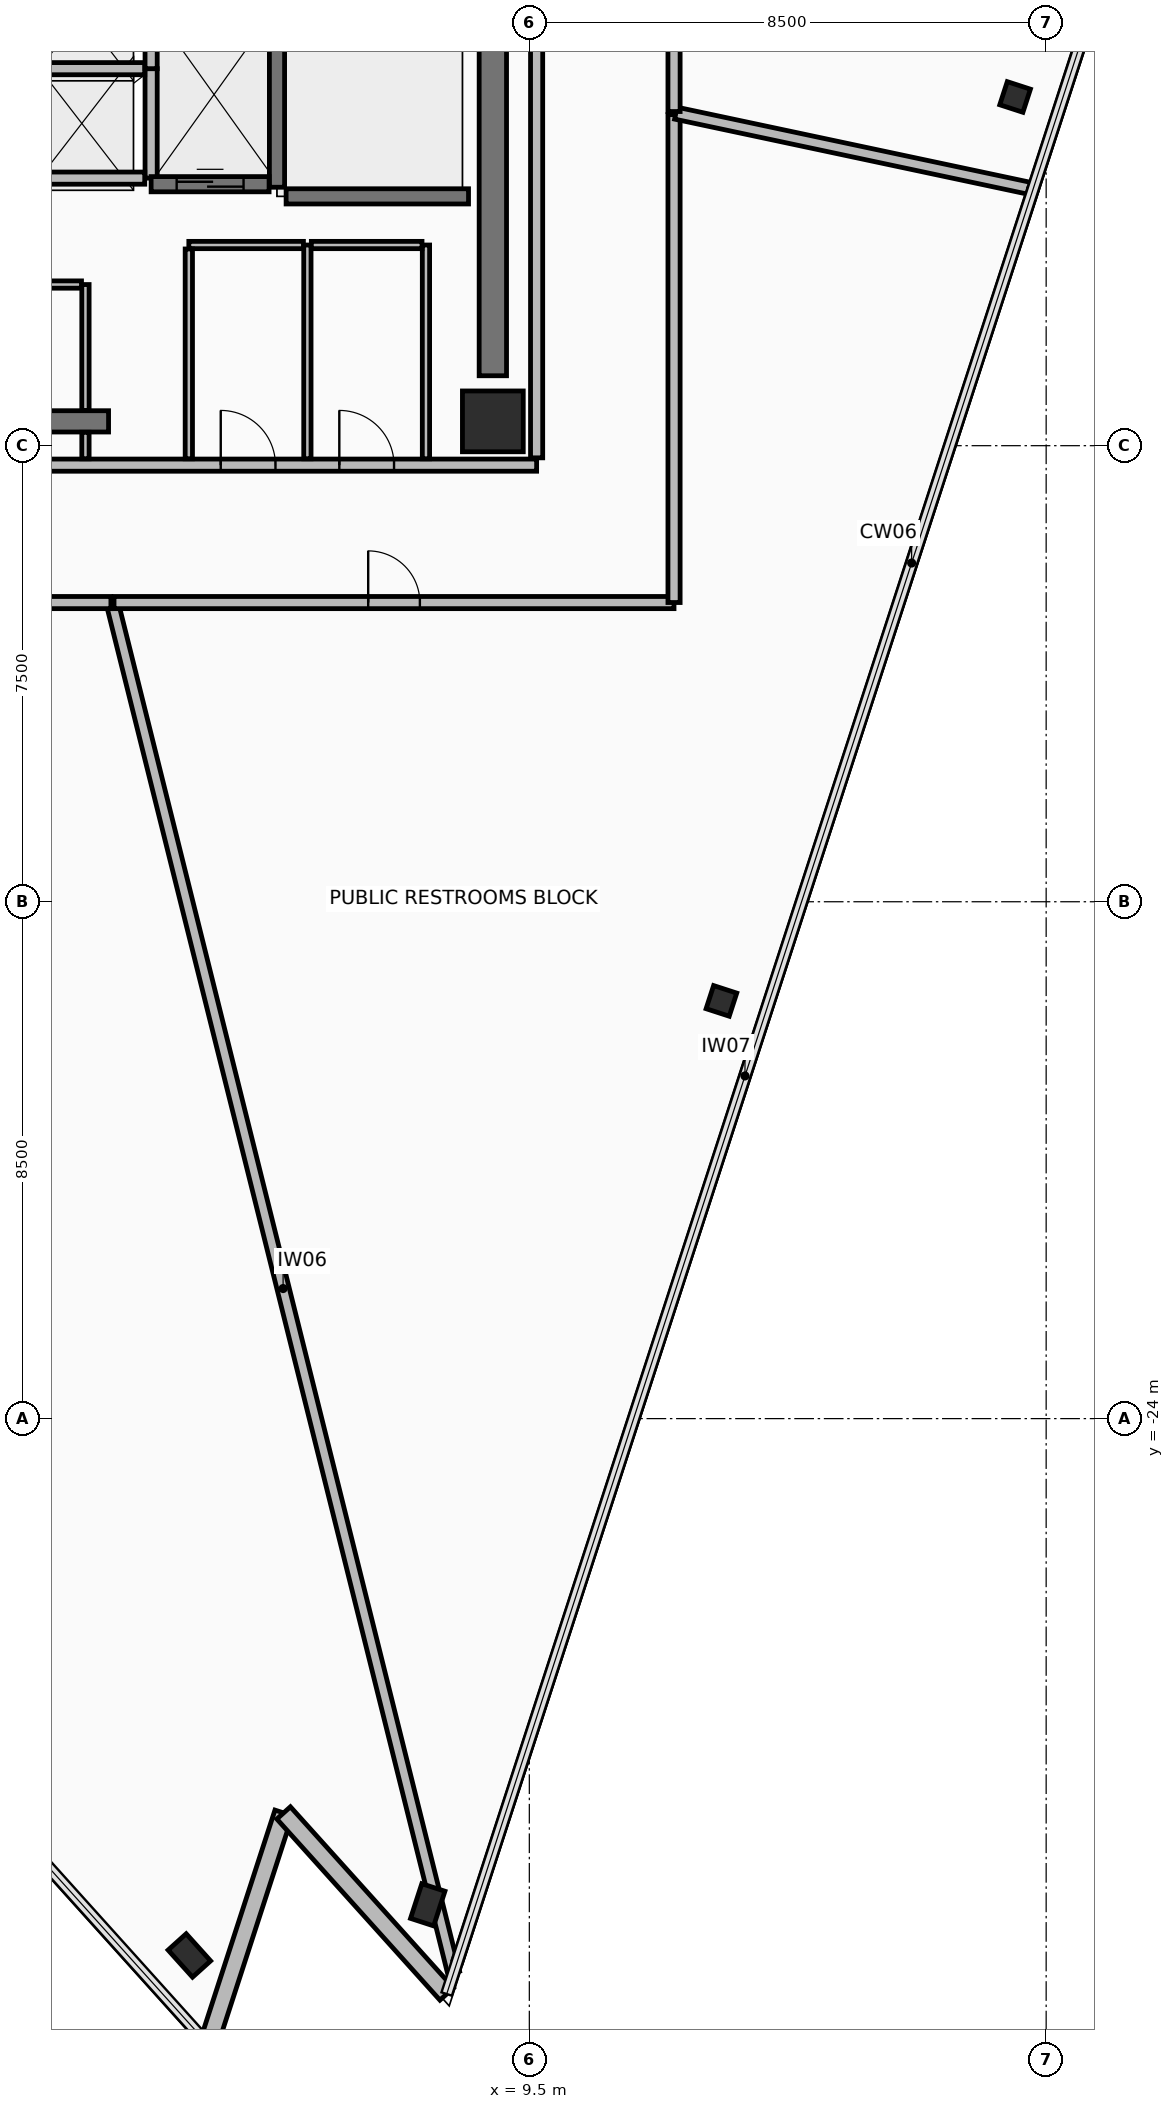
"""IFC4 building model, lengths in metres.
Left out: names, types, materials, properties, quantities, classifications, styles, units other than length and angle.
Written with IfcOpenShell. Run it as: python <this file> out.ifc"""

import sys

from ifc_helpers import new_model, si_unit, direction, frame, frame_2d, origin, origin_2d, place, context, subcontext, project, spatial, rectangle, hollow_rectangle, extrude, element, fill, save


model = new_model("IFC4")
c1 = context("Model", 3, precision=1e-05, world=origin(), true_north=direction((0.0, 1.0)))
c2 = subcontext(c1, "Body", "Model", "MODEL_VIEW")
j1 = project(units=[si_unit("LENGTHUNIT", "METRE"), si_unit("PLANEANGLEUNIT", "RADIAN")], contexts=[c1])
p1 = place(None, origin())
s1 = spatial("IfcSite", under=j1, at=p1, CompositionType="ELEMENT")
p2 = place(p1, origin())
s2 = spatial("IfcBuilding", under=s1, at=p2, CompositionType="ELEMENT")
p3 = place(p2, frame((0.0, 0.0, 283.4)))
s3 = spatial("IfcBuildingStorey", under=s2, at=p3, CompositionType="ELEMENT", Elevation=283.4)
p4 = place(p3, frame((8.9, -7.6, 0.0), z_axis=(0.0, 0.0, 1.0), x_axis=(1.0, 0.0, 0.0)))
e1 = element("IfcColumn", 1, at=p4, inside=s3, PredefinedType="COLUMN", context=c2, shape_type="SweptSolid", body=[
    extrude(rectangle(XDim=1.0, YDim=1.0, at=origin_2d()), origin(), (0.0, 0.0, 1.0), 3.65),
])
for number, where, z_axis, x_axis in (
    (2, (3.909, -32.829, 0.0), (0.0, 0.0, 1.0), (-0.669, 0.743, 0.0)),
    (3, (7.829, -31.996, 0.0), (0.0, 0.0, 1.0), (0.309, 0.951, 0.0)),
):
    element("IfcColumn", number, at=place(p3, frame(where, z_axis=z_axis, x_axis=x_axis)), inside=s3, PredefinedType="COLUMN", context=c2, shape_type="SweptSolid", body=[
        extrude(hollow_rectangle(XDim=0.4, YDim=0.6, WallThickness=0.03, at=origin_2d()), origin(), (0.0, 0.0, 1.0), 3.65),
    ])
for number, where, z_axis, x_axis in (
    (4, (12.659, -17.131, 0.0), (0.0, 0.0, 1.0), (0.309, 0.951, 0.0)),
    (5, (17.489, -2.265, 0.0), (0.0, 0.0, 1.0), (0.309, 0.951, 0.0)),
):
    element("IfcColumn", number, at=place(p3, frame(where, z_axis=z_axis, x_axis=x_axis)), inside=s3, PredefinedType="COLUMN", context=c2, shape_type="SweptSolid", body=[
        extrude(hollow_rectangle(XDim=0.4, YDim=0.4, WallThickness=0.025, at=origin_2d()), origin(), (0.0, 0.0, 1.0), 3.65),
    ])
p5 = place(p3, frame((4.221, -34.296, 0.0), z_axis=(0.0, 0.0, 1.0), x_axis=(0.309018580232, 0.951056001018, 0.0)))
e6 = element("IfcWall", 6, at=p5, inside=s3, PredefinedType="STANDARD", context=c2, shape_type="SweptSolid", body=[
    extrude(rectangle(XDim=4.008, YDim=0.3, at=frame_2d((2.004, 0.0))), origin(), (0.0, 0.0, 1.0), 2.81),
])
p6 = place(p3, frame((5.459, -30.484, 0.0), z_axis=(0.0, 0.0, 1.0), x_axis=(0.669132983361, -0.743142685208, 0.0)))
e7 = element("IfcWall", 7, at=p6, inside=s3, PredefinedType="STANDARD", context=c2, shape_type="SweptSolid", body=[
    extrude(rectangle(XDim=4.008, YDim=0.3, at=frame_2d((2.004, 0.0))), origin(), (0.0, 0.0, 1.0), 2.81),
])
p7 = place(p3, frame((-2.8, -7.6, 0.0), z_axis=(0.0, 0.0, 1.0), x_axis=(1.0, 0.0, 0.0)))
e8 = element("IfcWall", 8, at=p7, inside=s3, PredefinedType="SHEAR", context=c2, shape_type="SweptSolid", body=[
    extrude(rectangle(XDim=5.38, YDim=0.35, at=frame_2d((2.69, 0.0))), origin(), (0.0, 0.0, 1.0), 3.465),
])
p8 = place(p3, frame((8.9, -6.85, 0.0), z_axis=(0.0, 0.0, 1.0), x_axis=(0.0, 1.0, 0.0)))
e9 = element("IfcWall", 9, at=p8, inside=s3, PredefinedType="SHEAR", context=c2, shape_type="SweptSolid", body=[
    extrude(rectangle(XDim=10.7, YDim=0.45, at=frame_2d((5.35, 0.0))), origin(), (0.0, 0.0, 1.0), 3.465),
])
p9 = place(p3, frame((-9.62, -8.32, 0.0), z_axis=(0.0, 0.0, 1.0), x_axis=(1.0, 0.0, 0.0)))
e10 = element("IfcWall", 10, at=p9, inside=s3, PredefinedType="PARTITIONING", context=c2, shape_type="SweptSolid", body=[
    extrude(rectangle(XDim=19.24, YDim=0.2, at=frame_2d((9.62, 0.0))), origin(), (0.0, 0.0, 1.0), 2.96),
])
p10 = place(p9, frame((8.57, 0.0, 0.0)))
e11 = element("IfcOpeningElement", 11, at=p10, cuts=e10, PredefinedType="OPENING", context=c2, shape_type="SweptSolid", body=[
    extrude(rectangle(XDim=0.9, YDim=2.1, at=frame_2d((0.45, 1.05))), frame((0.0, 0.11, 0.0), z_axis=(0.0, -1.0, 0.0), x_axis=(1.0, 0.0, 0.0)), (0.0, 0.0, 1.0), 0.22),
])
p11 = place(p9, frame((14.045, 0.0, 0.0)))
e12 = element("IfcOpeningElement", 12, at=p11, cuts=e10, PredefinedType="OPENING", context=c2, shape_type="SweptSolid", body=[
    extrude(rectangle(XDim=0.9, YDim=2.1, at=frame_2d((0.45, 1.05))), frame((0.0, 0.11, 0.0), z_axis=(0.0, -1.0, 0.0), x_axis=(1.0, 0.0, 0.0)), (0.0, 0.0, 1.0), 0.22),
])
p12 = place(p9, frame((15.995, 0.0, 0.0)))
e13 = element("IfcOpeningElement", 13, at=p12, cuts=e10, PredefinedType="OPENING", context=c2, shape_type="SweptSolid", body=[
    extrude(rectangle(XDim=0.9, YDim=2.1, at=frame_2d((0.45, 1.05))), frame((0.0, 0.11, 0.0), z_axis=(0.0, -1.0, 0.0), x_axis=(1.0, 0.0, 0.0)), (0.0, 0.0, 1.0), 0.22),
])
p13 = place(p3, frame((9.62, -8.2, 0.0), z_axis=(0.0, 0.0, 1.0), x_axis=(0.0, 1.0, 0.0)))
e14 = element("IfcWall", 14, at=p13, inside=s3, PredefinedType="PARTITIONING", context=c2, shape_type="SweptSolid", body=[
    extrude(rectangle(XDim=16.4, YDim=0.2, at=frame_2d((8.2, 0.0))), origin(), (0.0, 0.0, 1.0), 2.96),
])
p14 = place(p13, frame((12.65, 0.0, 0.0)))
e15 = element("IfcOpeningElement", 15, at=p14, cuts=e14, PredefinedType="OPENING", context=c2, shape_type="SweptSolid", body=[
    extrude(rectangle(XDim=1.1, YDim=2.15, at=frame_2d((0.55, 1.075))), frame((0.0, 0.11, 0.0), z_axis=(0.0, -1.0, 0.0), x_axis=(1.0, 0.0, 0.0)), (0.0, 0.0, 1.0), 0.22),
])
p15 = place(p3, frame((5.35, -3.75, 0.0), z_axis=(0.0, 0.0, 1.0), x_axis=(0.0, 1.0, 0.0)))
e16 = element("IfcWall", 16, at=p15, inside=s3, PredefinedType="SHEAR", context=c2, shape_type="SweptSolid", body=[
    extrude(rectangle(XDim=7.3, YDim=0.25, at=frame_2d((3.65, 0.0))), origin(), (0.0, 0.0, 1.0), 3.465),
])
p16 = place(p3, frame((5.5, -3.9, 0.0), z_axis=(0.0, 0.0, 1.0), x_axis=(1.0, 0.0, 0.0)))
e17 = element("IfcWall", 17, at=p16, inside=s3, PredefinedType="SHEAR", context=c2, shape_type="SweptSolid", body=[
    extrude(rectangle(XDim=3.0, YDim=0.25, at=frame_2d((1.5, 0.0))), origin(), (0.0, 0.0, 1.0), 3.465),
])
p17 = place(p3, frame((3.28, -3.6, 0.0), z_axis=(0.0, 0.0, 1.0), x_axis=(0.0, 1.0, 0.0)))
e18 = element("IfcWall", 18, at=p17, inside=s3, PredefinedType="PARTITIONING", context=c2, shape_type="SweptSolid", body=[
    extrude(rectangle(XDim=1.8, YDim=0.2, at=frame_2d((0.9, 0.0))), origin(), (0.0, 0.0, 1.0), 3.465),
])
for number, where, z_axis, x_axis in (
    (19, (1.13, -3.6, 0.0), (0.0, 0.0, 1.0), (1.0, 0.0, 0.0)),
    (20, (1.13, -1.8, 0.0), (0.0, 0.0, 1.0), (1.0, 0.0, 0.0)),
):
    element("IfcWall", number, at=place(p3, frame(where, z_axis=z_axis, x_axis=x_axis)), inside=s3, PredefinedType="PARTITIONING", context=c2, shape_type="SweptSolid", body=[
        extrude(rectangle(XDim=2.045, YDim=0.2, at=frame_2d((1.022, 0.0))), origin(), (0.0, 0.0, 1.0), 3.465),
    ])
p18 = place(p3, frame((3.28, -1.8, 0.0), z_axis=(0.0, 0.0, 1.0), x_axis=(0.0, 1.0, 0.0)))
e21 = element("IfcWall", 21, at=p18, inside=s3, PredefinedType="PARTITIONING", context=c2, shape_type="SweptSolid", body=[
    extrude(rectangle(XDim=1.8, YDim=0.2, at=frame_2d((0.9, 0.0))), origin(), (0.0, 0.0, 1.0), 3.465),
])
p19 = place(p3, frame((3.28, -3.7, 0.0), z_axis=(0.0, 0.0, 1.0), x_axis=(1.0, 0.0, 0.0)))
e22 = element("IfcWall", 22, at=p19, inside=s3, PredefinedType="SHEAR", context=c2, shape_type="SweptSolid", body=[
    extrude(rectangle(XDim=1.94, YDim=0.25, at=frame_2d((0.97, 0.0))), origin(), (0.0, 0.0, 1.0), 3.465),
])
p20 = place(p19, frame((0.42, 0.0, 0.0)))
e23 = element("IfcOpeningElement", 23, at=p20, cuts=e22, PredefinedType="OPENING", context=c2, shape_type="SweptSolid", body=[
    extrude(rectangle(XDim=1.1, YDim=2.2, at=frame_2d((0.55, 1.1))), frame((0.0, 0.135, 0.0), z_axis=(0.0, -1.0, 0.0), x_axis=(1.0, 0.0, 0.0)), (0.0, 0.0, 1.0), 0.27),
])
p21 = place(p3, frame((2.2, -8.215, 0.0), z_axis=(0.0, 0.0, 1.0), x_axis=(0.0, 1.0, 0.0)))
e24 = element("IfcWall", 24, at=p21, inside=s3, PredefinedType="PARTITIONING", context=c2, shape_type="SweptSolid", body=[
    extrude(rectangle(XDim=0.435, YDim=0.12, at=frame_2d((0.218, 0.0))), origin(), (0.0, 0.0, 1.0), 2.76),
])
p22 = place(p3, frame((2.2, -7.42, 0.0), z_axis=(0.0, 0.0, 1.0), x_axis=(0.0, 1.0, 0.0)))
e25 = element("IfcWall", 25, at=p22, inside=s3, PredefinedType="PARTITIONING", context=c2, shape_type="SweptSolid", body=[
    extrude(rectangle(XDim=2.07, YDim=0.12, at=frame_2d((1.035, 0.0))), origin(), (0.0, 0.0, 1.0), 2.76),
])
p23 = place(p3, frame((2.135, -5.35, 0.0), z_axis=(0.0, 0.0, 1.0), x_axis=(-1.0, 0.0, 0.0)))
e26 = element("IfcWall", 26, at=p23, inside=s3, PredefinedType="PARTITIONING", context=c2, shape_type="SweptSolid", body=[
    extrude(rectangle(XDim=5.535, YDim=0.12, at=frame_2d((2.768, 0.0))), origin(), (0.0, 0.0, 1.0), 2.76),
])
p24 = place(p3, frame((5.85, -8.215, 0.0), z_axis=(0.0, 0.0, 1.0), x_axis=(0.0, 1.0, 0.0)))
e27 = element("IfcWall", 27, at=p24, inside=s3, PredefinedType="PARTITIONING", context=c2, shape_type="SweptSolid", body=[
    extrude(rectangle(XDim=3.515, YDim=0.12, at=frame_2d((1.758, 0.0))), origin(), (0.0, 0.0, 1.0), 2.76),
])
p25 = place(p3, frame((5.785, -4.7, 0.0), z_axis=(0.0, 0.0, 1.0), x_axis=(-1.0, 0.0, 0.0)))
e28 = element("IfcWall", 28, at=p25, inside=s3, PredefinedType="PARTITIONING", context=c2, shape_type="SweptSolid", body=[
    extrude(rectangle(XDim=1.885, YDim=0.12, at=frame_2d((0.942, 0.0))), origin(), (0.0, 0.0, 1.0), 3.465),
])
p26 = place(p3, frame((3.9, -4.765, 0.0), z_axis=(0.0, 0.0, 1.0), x_axis=(0.0, -1.0, 0.0)))
e29 = element("IfcWall", 29, at=p26, inside=s3, PredefinedType="PARTITIONING", context=c2, shape_type="SweptSolid", body=[
    extrude(rectangle(XDim=3.45, YDim=0.12, at=frame_2d((1.725, 0.0))), origin(), (0.0, 0.0, 1.0), 2.76),
])
p27 = place(p3, frame((7.8, -8.215, 0.0), z_axis=(0.0, 0.0, 1.0), x_axis=(0.0, 1.0, 0.0)))
e30 = element("IfcWall", 30, at=p27, inside=s3, PredefinedType="PARTITIONING", context=c2, shape_type="SweptSolid", body=[
    extrude(rectangle(XDim=3.515, YDim=0.12, at=frame_2d((1.758, 0.0))), origin(), (0.0, 0.0, 1.0), 2.76),
])
p28 = place(p3, frame((7.735, -4.7, 0.0), z_axis=(0.0, 0.0, 1.0), x_axis=(-1.0, 0.0, 0.0)))
e31 = element("IfcWall", 31, at=p28, inside=s3, PredefinedType="PARTITIONING", context=c2, shape_type="SweptSolid", body=[
    extrude(rectangle(XDim=1.82, YDim=0.12, at=frame_2d((0.91, 0.0))), origin(), (0.0, 0.0, 1.0), 3.465),
])
p29 = place(p3, frame((8.256, -33.111, 0.0), z_axis=(0.0, 0.0, 1.0), x_axis=(-0.241931126379, 0.970293424738, 0.0)))
e32 = element("IfcWall", 32, at=p29, inside=s3, PredefinedType="PARTITIONING", context=c2, shape_type="SweptSolid", body=[
    extrude(rectangle(XDim=23.189, YDim=0.2, at=frame_2d((11.594, 0.0))), origin(), (0.0, 0.0, 1.0), 2.81),
])
p30 = place(p3, frame((2.67, -10.58, 0.0), z_axis=(0.0, 0.0, 1.0), x_axis=(1.0, 0.0, 0.0)))
e33 = element("IfcWall", 33, at=p30, inside=s3, PredefinedType="PARTITIONING", context=c2, shape_type="SweptSolid", body=[
    extrude(rectangle(XDim=9.209, YDim=0.2, at=frame_2d((4.605, 0.0))), origin(), (0.0, 0.0, 1.0), 2.96),
])
p31 = place(p30, frame((4.18, 0.0, 0.0)))
e34 = element("IfcOpeningElement", 34, at=p31, cuts=e33, PredefinedType="OPENING", context=c2, shape_type="SweptSolid", body=[
    extrude(rectangle(XDim=0.85, YDim=2.1, at=frame_2d((0.425, 1.05))), frame((0.0, 0.11, 0.0), z_axis=(0.0, -1.0, 0.0), x_axis=(1.0, 0.0, 0.0)), (0.0, 0.0, 1.0), 0.22),
])
p32 = place(p3, frame((11.88, -10.579, 0.0), z_axis=(0.0, 0.0, 1.0), x_axis=(0.0, 1.0, 0.0)))
e35 = element("IfcWall", 35, at=p32, inside=s3, PredefinedType="PARTITIONING", context=c2, shape_type="SweptSolid", body=[
    extrude(rectangle(XDim=8.023, YDim=0.2, at=frame_2d((4.012, 0.0))), origin(), (0.0, 0.0, 1.0), 2.96),
])
p33 = place(p3, frame((11.91, -2.531, 0.0), z_axis=(0.0, 0.0, 1.0), x_axis=(0.978144111738, -0.207928104574, 0.0)))
e36 = element("IfcWall", 36, at=p33, inside=s3, PredefinedType="PARTITIONING", context=c2, shape_type="SweptSolid", body=[
    extrude(rectangle(XDim=5.979, YDim=0.2, at=frame_2d((2.989, 0.0))), origin(), (0.0, 0.0, 1.0), 2.81),
])
p34 = place(p3, frame((17.777, -3.807, 0.0), z_axis=(0.0, 0.0, 1.0), x_axis=(-0.309024581215, -0.951054051148, 0.0)))
e37 = element("IfcWall", 37, at=p34, inside=s3, PredefinedType="PARTITIONING", context=c2, shape_type="SweptSolid", body=[
    extrude(rectangle(XDim=30.614, YDim=0.15, at=frame_2d((15.307, 0.0))), origin(), (0.0, 0.0, 1.0), 3.465),
])
p35 = place(p3, frame((23.379, 13.433, 0.0), z_axis=(0.0, 0.0, 1.0), x_axis=(-0.309022856951, -0.951054611409, 0.0)))
e38 = element("IfcWall", 38, at=p35, inside=s3, PredefinedType="PARTITIONING", context=c2, shape_type="SweptSolid", body=[
    extrude(rectangle(XDim=18.077, YDim=0.15, at=frame_2d((9.039, 0.0))), origin(), (0.0, 0.0, 1.0), 3.465),
])
p36 = place(p3, frame((11.88, -2.505, 0.0), z_axis=(0.0, 0.0, 1.0), x_axis=(0.0, 1.0, 0.0)))
e39 = element("IfcWall", 39, at=p36, inside=s3, PredefinedType="PARTITIONING", context=c2, shape_type="SweptSolid", body=[
    extrude(rectangle(XDim=13.084, YDim=0.2, at=frame_2d((6.542, 0.0))), origin(), (0.0, 0.0, 1.0), 2.96),
])
p37 = place(p36, frame((6.117, 0.0, 0.0)))
e40 = element("IfcOpeningElement", 40, at=p37, cuts=e39, PredefinedType="OPENING", context=c2, shape_type="SweptSolid", body=[
    extrude(rectangle(XDim=0.85, YDim=2.1, at=frame_2d((0.425, 1.05))), frame((0.0, 0.11, 0.0), z_axis=(0.0, -1.0, 0.0), x_axis=(1.0, 0.0, 0.0)), (0.0, 0.0, 1.0), 0.22),
])
p38 = place(p3, frame((-11.879, -10.58, 0.0), z_axis=(0.0, 0.0, 1.0), x_axis=(1.0, 0.0, 0.0)))
e41 = element("IfcWall", 41, at=p38, inside=s3, PredefinedType="PARTITIONING", context=c2, shape_type="SweptSolid", body=[
    extrude(rectangle(XDim=14.498, YDim=0.2, at=frame_2d((7.249, 0.0))), origin(), (0.0, 0.0, 1.0), 2.96),
])
p39 = place(p38, frame((6.649, 0.0, 0.0)))
e42 = element("IfcOpeningElement", 42, at=p39, cuts=e41, PredefinedType="OPENING", context=c2, shape_type="SweptSolid", body=[
    extrude(rectangle(XDim=1.2, YDim=2.15, at=frame_2d((0.6, 1.075))), frame((0.0, 0.11, 0.0), z_axis=(0.0, -1.0, 0.0), x_axis=(1.0, 0.0, 0.0)), (0.0, 0.0, 1.0), 0.22),
])
p40 = place(p20, origin())
e43 = element("IfcDoor", 43, at=p40, inside=s3, OperationType="SLIDING_TO_LEFT", PredefinedType="DOOR", context=c2, shape_type="SweptSolid", body=[
    extrude(rectangle(XDim=1.1, YDim=2.2, at=frame_2d((0.55, 1.1))), frame((0.0, 0.025, 0.0), z_axis=(0.0, -1.0, 0.0), x_axis=(1.0, 0.0, 0.0)), (0.0, 0.0, 1.0), 0.05),
])
fill(e23, e43)
p41 = place(p11, origin())
e44 = element("IfcDoor", 44, at=p41, inside=s3, OperationType="SINGLE_SWING_LEFT", PredefinedType="DOOR", context=c2, shape_type="SweptSolid", body=[
    extrude(rectangle(XDim=0.9, YDim=2.1, at=frame_2d((0.45, 1.05))), frame((0.0, 0.025, 0.0), z_axis=(0.0, -1.0, 0.0), x_axis=(1.0, 0.0, 0.0)), (0.0, 0.0, 1.0), 0.05),
])
fill(e12, e44)
p42 = place(p12, origin())
e45 = element("IfcDoor", 45, at=p42, inside=s3, OperationType="SINGLE_SWING_LEFT", PredefinedType="DOOR", context=c2, shape_type="SweptSolid", body=[
    extrude(rectangle(XDim=0.9, YDim=2.1, at=frame_2d((0.45, 1.05))), frame((0.0, 0.025, 0.0), z_axis=(0.0, -1.0, 0.0), x_axis=(1.0, 0.0, 0.0)), (0.0, 0.0, 1.0), 0.05),
])
fill(e13, e45)
p43 = place(p31, origin())
e46 = element("IfcDoor", 46, at=p43, inside=s3, OperationType="SINGLE_SWING_RIGHT", PredefinedType="DOOR", context=c2, shape_type="SweptSolid", body=[
    extrude(rectangle(XDim=0.85, YDim=2.1, at=frame_2d((0.425, 1.05))), frame((0.0, 0.025, 0.0), z_axis=(0.0, -1.0, 0.0), x_axis=(1.0, 0.0, 0.0)), (0.0, 0.0, 1.0), 0.05),
])
fill(e34, e46)
save(model, sys.argv[1])
